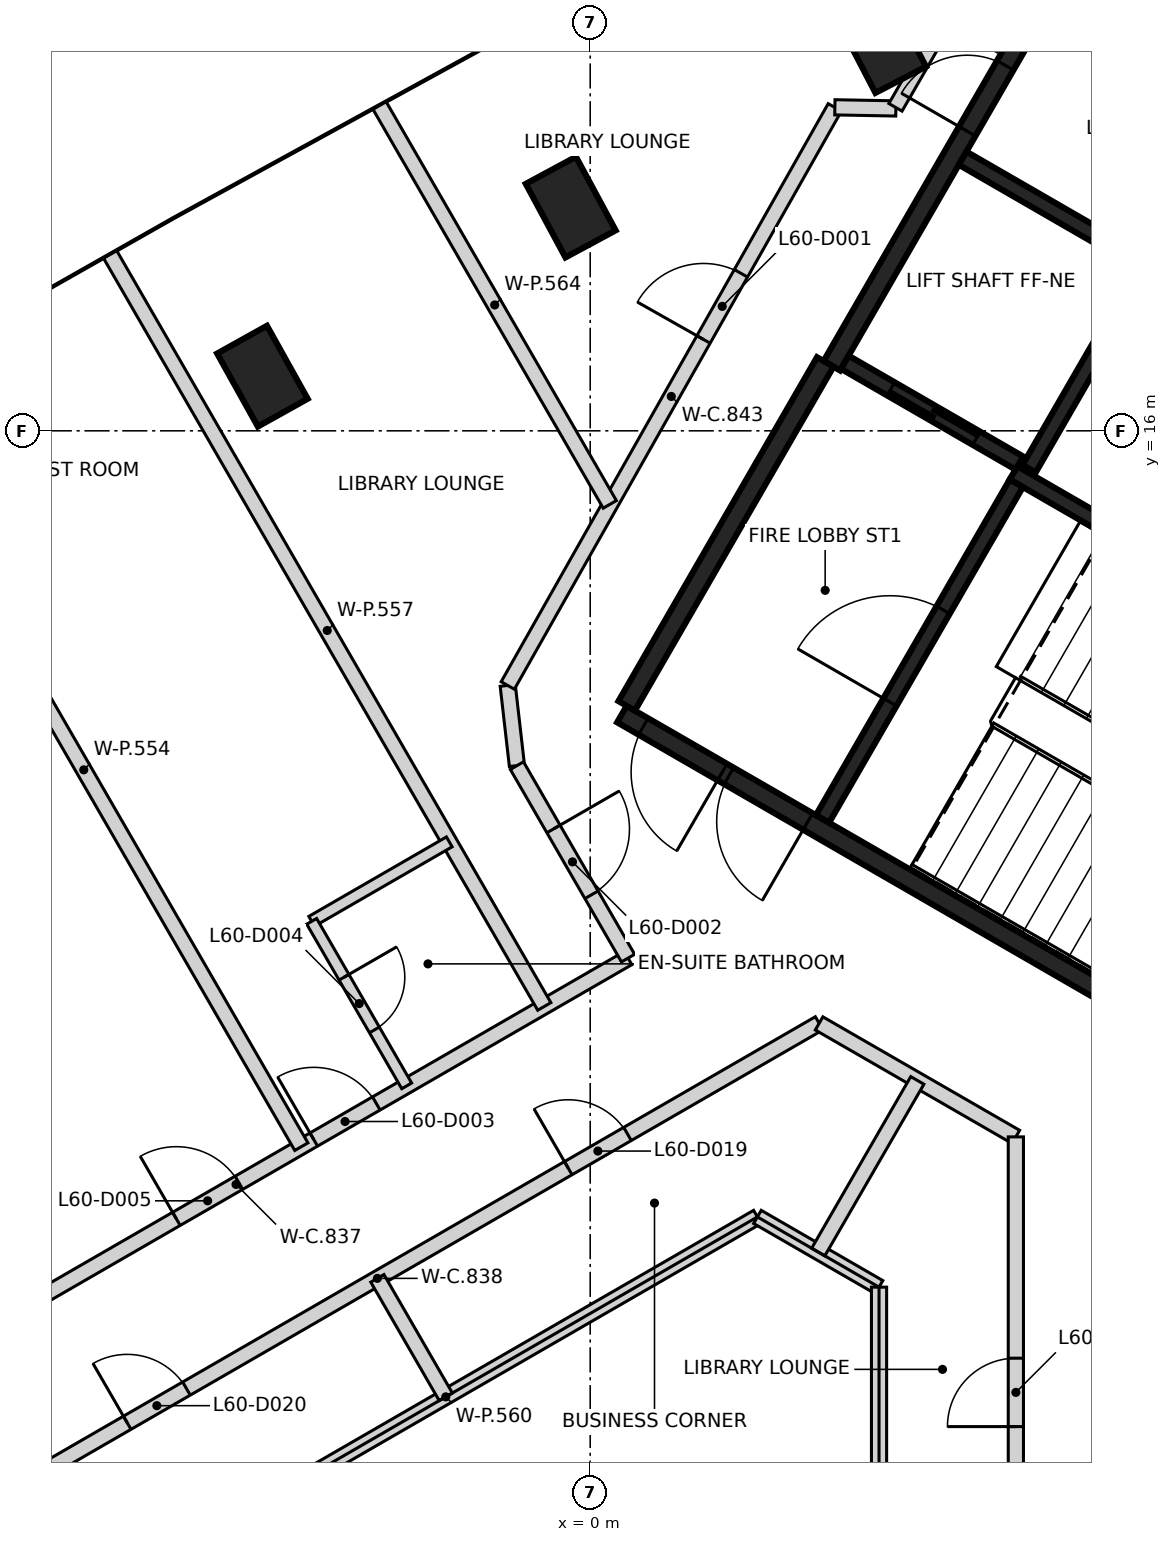
"""IFC4 building model, lengths in metres.
Left out: names, types, materials, properties, quantities, classifications, styles, units other than length and angle.
Written with IfcOpenShell. Run it as: python <this file> out.ifc"""

import sys

from ifc_helpers import new_model, si_unit, direction, frame, frame_2d, origin, origin_2d, place, context, subcontext, project, spatial, rectangle, extrude, element, fill, save


model = new_model("IFC4")
c1 = context("Model", 3, precision=1e-05, world=origin(), true_north=direction((0.0, 1.0)))
c2 = subcontext(c1, "Body", "Model", "MODEL_VIEW")
j1 = project(units=[si_unit("LENGTHUNIT", "METRE"), si_unit("PLANEANGLEUNIT", "RADIAN")], contexts=[c1])
p1 = place(None, origin())
s1 = spatial("IfcSite", under=j1, at=p1, CompositionType="ELEMENT")
p2 = place(p1, origin())
s2 = spatial("IfcBuilding", under=s1, at=p2, CompositionType="ELEMENT")
p3 = place(p2, frame((0.0, 0.0, 239.4)))
s3 = spatial("IfcBuildingStorey", under=s2, at=p3, CompositionType="ELEMENT", Elevation=239.4)
for number, where, z_axis, x_axis in (
    (1, (3.832, 21.107, -0.35), (0.0, 0.0, 1.0), (-0.461, 0.887, 0.0)),
    (2, (-0.256, 18.943, -0.35), (0.0, 0.0, 1.0), (-0.475, 0.88, 0.0)),
    (3, (-4.312, 16.719, -0.35), (0.0, 0.0, 1.0), (-0.487, 0.873, 0.0)),
):
    element("IfcColumn", number, at=place(p3, frame(where, z_axis=z_axis, x_axis=x_axis)), inside=s3, PredefinedType="COLUMN", context=c2, shape_type="SweptSolid", body=[
        extrude(rectangle(XDim=1.1, YDim=0.75, at=origin_2d()), origin(), (0.0, 0.0, 1.0), 3.6),
    ])
p4 = place(p3, frame((10.42, 6.498, 0.0), z_axis=(0.0, 0.0, 1.0), x_axis=(-0.866021906294, 0.500006057782, 0.0)))
e4 = element("IfcWall", 4, at=p4, inside=s3, PredefinedType="SHEAR", context=c2, shape_type="SweptSolid", body=[
    extrude(rectangle(XDim=11.55, YDim=0.25, at=frame_2d((5.775, 0.0))), origin(), (0.0, 0.0, 1.0), 3.25),
])
p5 = place(p4, frame((10.025, 0.0, 0.0)))
e5 = element("IfcOpeningElement", 5, at=p5, cuts=e4, PredefinedType="OPENING", context=c2, shape_type="SweptSolid", body=[
    extrude(rectangle(XDim=1.2, YDim=2.1, at=frame_2d((0.6, 1.05))), frame((0.0, 0.135, 0.0), z_axis=(0.0, -1.0, 0.0), x_axis=(1.0, 0.0, 0.0)), (0.0, 0.0, 1.0), 0.27),
])
p6 = place(p4, frame((8.725, 0.0, 0.0)))
e6 = element("IfcOpeningElement", 6, at=p6, cuts=e4, PredefinedType="OPENING", context=c2, shape_type="SweptSolid", body=[
    extrude(rectangle(XDim=1.2, YDim=2.1, at=frame_2d((0.6, 1.05))), frame((0.0, 0.135, 0.0), z_axis=(0.0, -1.0, 0.0), x_axis=(1.0, 0.0, 0.0)), (0.0, 0.0, 1.0), 0.27),
])
p7 = place(p3, frame((6.304, 22.269, 0.0), z_axis=(0.0, 0.0, 1.0), x_axis=(0.866022959057, -0.500004234368, 0.0)))
e7 = element("IfcWall", 7, at=p7, inside=s3, PredefinedType="SHEAR", context=c2, shape_type="SweptSolid", body=[
    extrude(rectangle(XDim=8.75, YDim=0.25, at=frame_2d((4.375, 0.0))), origin(), (0.0, 0.0, 1.0), 3.25),
])
p8 = place(p3, frame((3.179, 16.856, 0.0), z_axis=(0.0, 0.0, 1.0), x_axis=(0.500001955336, 0.866024274868, 0.0)))
e8 = element("IfcWall", 8, at=p8, inside=s3, PredefinedType="SHEAR", context=c2, shape_type="SweptSolid", body=[
    extrude(rectangle(XDim=6.125, YDim=0.25, at=frame_2d((3.062, 0.0))), origin(), (0.0, 0.0, 1.0), 3.25),
])
p9 = place(p8, frame((3.563, 0.0, 0.0)))
e9 = element("IfcOpeningElement", 9, at=p9, cuts=e8, PredefinedType="OPENING", context=c2, shape_type="SweptSolid", body=[
    extrude(rectangle(XDim=1.0, YDim=2.1, at=frame_2d((0.5, 1.05))), frame((0.0, 0.135, 0.0), z_axis=(0.0, -1.0, 0.0), x_axis=(1.0, 0.0, 0.0)), (0.0, 0.0, 1.0), 0.27),
])
p10 = place(p3, frame((0.48, 12.381, 0.0), z_axis=(0.0, 0.0, 1.0), x_axis=(0.49999885962, 0.866026062182, 0.0)))
e10 = element("IfcWall", 10, at=p10, inside=s3, PredefinedType="SHEAR", context=c2, shape_type="SweptSolid", body=[
    extrude(rectangle(XDim=5.225, YDim=0.25, at=frame_2d((2.612, 0.0))), origin(), (0.0, 0.0, 1.0), 3.25),
])
p11 = place(p3, frame((10.743, 12.46, 0.0), z_axis=(0.0, 0.0, 1.0), x_axis=(-0.866018848283, 0.500011354289, 0.0)))
e11 = element("IfcWall", 11, at=p11, inside=s3, PredefinedType="SHEAR", context=c2, shape_type="SweptSolid", body=[
    extrude(rectangle(XDim=5.974, YDim=0.2, at=frame_2d((2.987, 0.0))), origin(), (0.0, 0.0, 1.0), 3.25),
])
p12 = place(p3, frame((3.057, 10.895, 0.0), z_axis=(0.0, 0.0, 1.0), x_axis=(0.500027839223, 0.866009330205, 0.0)))
e12 = element("IfcWall", 12, at=p12, inside=s3, PredefinedType="SHEAR", context=c2, shape_type="SweptSolid", body=[
    extrude(rectangle(XDim=5.098, YDim=0.2, at=frame_2d((2.549, 0.0))), origin(), (0.0, 0.0, 1.0), 3.25),
])
p13 = place(p12, frame((1.774, 0.0, 0.0)))
e13 = element("IfcOpeningElement", 13, at=p13, cuts=e12, PredefinedType="OPENING", context=c2, shape_type="SweptSolid", body=[
    extrude(rectangle(XDim=1.4, YDim=2.1, at=frame_2d((0.7, 1.05))), frame((0.0, 0.11, 0.0), z_axis=(0.0, -1.0, 0.0), x_axis=(1.0, 0.0, 0.0)), (0.0, 0.0, 1.0), 0.22),
])
p14 = place(p3, frame((7.324, 18.187, 0.0), z_axis=(0.0, 0.0, 1.0), x_axis=(-0.499967891604, -0.866043940782, 0.0)))
e14 = element("IfcWall", 14, at=p14, inside=s3, PredefinedType="SHEAR", context=c2, shape_type="SweptSolid", body=[
    extrude(rectangle(XDim=3.1, YDim=0.2, at=frame_2d((1.55, 0.0))), origin(), (0.0, 0.0, 1.0), 3.25),
])
p15 = place(p3, frame((5.646, 15.576, 0.0), z_axis=(0.0, 0.0, 1.0), x_axis=(-0.866018407898, 0.500012117035, 0.0)))
e15 = element("IfcWall", 15, at=p15, inside=s3, PredefinedType="SHEAR", context=c2, shape_type="SweptSolid", body=[
    extrude(rectangle(XDim=2.651, YDim=0.2, at=frame_2d((1.325, 0.0))), origin(), (0.0, 0.0, 1.0), 3.25),
])
p16 = place(p15, frame((0.652, 0.0, 0.0)))
e16 = element("IfcOpeningElement", 16, at=p16, cuts=e15, PredefinedType="OPENING", context=c2, shape_type="SweptSolid", body=[
    extrude(rectangle(XDim=1.3, YDim=2.1, at=frame_2d((0.65, 1.05))), frame((0.0, 0.11, 0.0), z_axis=(0.0, -1.0, 0.0), x_axis=(1.0, 0.0, 0.0)), (0.0, 0.0, 1.0), 0.22),
])
p17 = place(p3, frame((7.196, 18.26, 0.0), z_axis=(0.0, 0.0, 1.0), x_axis=(-0.866018407898, 0.500012117035, 0.0)))
e17 = element("IfcWall", 17, at=p17, inside=s3, PredefinedType="SHEAR", context=c2, shape_type="SweptSolid", body=[
    extrude(rectangle(XDim=2.651, YDim=0.2, at=frame_2d((1.325, 0.0))), origin(), (0.0, 0.0, 1.0), 3.25),
])
p18 = place(p3, frame((-9.817, 3.108, 0.0), z_axis=(0.0, 0.0, 1.0), x_axis=(0.86603471326, 0.499983875168, 0.0)))
e18 = element("IfcWall", 18, at=p18, inside=s3, PredefinedType="PARTITIONING", context=c2, shape_type="SweptSolid", body=[
    extrude(rectangle(XDim=11.911, YDim=0.2, at=frame_2d((5.955, 0.0))), origin(), (0.0, 0.0, 1.0), 3.25),
])
p19 = place(p18, frame((7.136, 0.0, 0.0)))
e19 = element("IfcOpeningElement", 19, at=p19, cuts=e18, PredefinedType="OPENING", context=c2, shape_type="SweptSolid", body=[
    extrude(rectangle(XDim=0.95, YDim=2.1, at=frame_2d((0.475, 1.05))), frame((0.0, 0.11, 0.0), z_axis=(0.0, -1.0, 0.0), x_axis=(1.0, 0.0, 0.0)), (0.0, 0.0, 1.0), 0.22),
])
p20 = place(p18, frame((5.049, 0.0, 0.0)))
e20 = element("IfcOpeningElement", 20, at=p20, cuts=e18, PredefinedType="OPENING", context=c2, shape_type="SweptSolid", body=[
    extrude(rectangle(XDim=0.95, YDim=2.1, at=frame_2d((0.475, 1.05))), frame((0.0, 0.11, 0.0), z_axis=(0.0, -1.0, 0.0), x_axis=(1.0, 0.0, 0.0)), (0.0, 0.0, 1.0), 0.22),
])
p21 = place(p3, frame((-8.612, 1.494, 0.0), z_axis=(0.0, 0.0, 1.0), x_axis=(0.8660441356, 0.49996755414, 0.0)))
e21 = element("IfcWall", 21, at=p21, inside=s3, PredefinedType="PARTITIONING", context=c2, shape_type="SweptSolid", body=[
    extrude(rectangle(XDim=13.422, YDim=0.2, at=frame_2d((6.711, 0.0))), origin(), (0.0, 0.0, 1.0), 3.25),
])
p22 = place(p21, frame((9.611, 0.0, 0.0)))
e22 = element("IfcOpeningElement", 22, at=p22, cuts=e21, PredefinedType="OPENING", context=c2, shape_type="SweptSolid", body=[
    extrude(rectangle(XDim=0.9, YDim=2.1, at=frame_2d((0.45, 1.05))), frame((0.0, 0.11, 0.0), z_axis=(0.0, -1.0, 0.0), x_axis=(1.0, 0.0, 0.0)), (0.0, 0.0, 1.0), 0.22),
])
p23 = place(p21, frame((2.911, 0.0, 0.0)))
e23 = element("IfcOpeningElement", 23, at=p23, cuts=e21, PredefinedType="OPENING", context=c2, shape_type="SweptSolid", body=[
    extrude(rectangle(XDim=0.9, YDim=2.1, at=frame_2d((0.45, 1.05))), frame((0.0, 0.11, 0.0), z_axis=(0.0, -1.0, 0.0), x_axis=(1.0, 0.0, 0.0)), (0.0, 0.0, 1.0), 0.22),
])
p24 = place(p3, frame((-1.085, 12.65, 0.0), z_axis=(0.0, 0.0, 1.0), x_axis=(0.113812454263, -0.993502252264, 0.0)))
e24 = element("IfcWall", 24, at=p24, inside=s3, PredefinedType="PARTITIONING", context=c2, shape_type="SweptSolid", body=[
    extrude(rectangle(XDim=1.062, YDim=0.2, at=frame_2d((0.531, 0.0))), origin(), (0.0, 0.0, 1.0), 3.25),
])
p25 = place(p3, frame((-1.084, 12.65, 0.0), z_axis=(0.0, 0.0, 1.0), x_axis=(0.492373019537, 0.87038428848, 0.0)))
e25 = element("IfcWall", 25, at=p25, inside=s3, PredefinedType="PARTITIONING", context=c2, shape_type="SweptSolid", body=[
    extrude(rectangle(XDim=8.738, YDim=0.2, at=frame_2d((4.369, 0.0))), origin(), (0.0, 0.0, 1.0), 3.25),
])
p26 = place(p25, frame((5.23, 0.0, 0.0)))
e26 = element("IfcOpeningElement", 26, at=p26, cuts=e25, PredefinedType="OPENING", context=c2, shape_type="SweptSolid", body=[
    extrude(rectangle(XDim=1.0, YDim=2.1, at=frame_2d((0.5, 1.05))), frame((0.0, 0.11, 0.0), z_axis=(0.0, -1.0, 0.0), x_axis=(1.0, 0.0, 0.0)), (0.0, 0.0, 1.0), 0.22),
])
p27 = place(p3, frame((-0.964, 11.595, 0.0), z_axis=(0.0, 0.0, 1.0), x_axis=(0.500081432713, -0.865978383481, 0.0)))
e27 = element("IfcWall", 27, at=p27, inside=s3, PredefinedType="PARTITIONING", context=c2, shape_type="SweptSolid", body=[
    extrude(rectangle(XDim=2.924, YDim=0.2, at=frame_2d((1.462, 0.0))), origin(), (0.0, 0.0, 1.0), 3.25),
])
p28 = place(p27, frame((0.962, 0.0, 0.0)))
e28 = element("IfcOpeningElement", 28, at=p28, cuts=e27, PredefinedType="OPENING", context=c2, shape_type="SweptSolid", body=[
    extrude(rectangle(XDim=1.0, YDim=2.1, at=frame_2d((0.5, 1.05))), frame((0.0, 0.11, 0.0), z_axis=(0.0, -1.0, 0.0), x_axis=(1.0, 0.0, 0.0)), (0.0, 0.0, 1.0), 0.22),
])
p29 = place(p3, frame((3.011, 8.204, 0.0), z_axis=(0.0, 0.0, 1.0), x_axis=(0.86628077395, -0.499557424812, 0.0)))
e29 = element("IfcWall", 29, at=p29, inside=s3, PredefinedType="PARTITIONING", context=c2, shape_type="SweptSolid", body=[
    extrude(rectangle(XDim=2.989, YDim=0.2, at=frame_2d((1.494, 0.0))), origin(), (0.0, 0.0, 1.0), 3.25),
])
p30 = place(p3, frame((3.219, 20.256, 0.0), z_axis=(0.0, 0.0, 1.0), x_axis=(0.99982237262, -0.0188473661, 0.0)))
e30 = element("IfcWall", 30, at=p30, inside=s3, PredefinedType="PARTITIONING", context=c2, shape_type="SweptSolid", body=[
    extrude(rectangle(XDim=0.803, YDim=0.2, at=frame_2d((0.402, 0.0))), origin(), (0.0, 0.0, 1.0), 3.25),
])
p31 = place(p3, frame((4.016, 20.256, 0.0), z_axis=(0.0, 0.0, 1.0), x_axis=(0.500135180047, 0.865947343479, 0.0)))
e31 = element("IfcWall", 31, at=p31, inside=s3, PredefinedType="PARTITIONING", context=c2, shape_type="SweptSolid", body=[
    extrude(rectangle(XDim=1.399, YDim=0.2, at=frame_2d((0.7, 0.0))), origin(), (0.0, 0.0, 1.0), 2.35),
])
p32 = place(p3, frame((5.6, -6.711, 0.0), z_axis=(0.0, 0.0, 1.0), x_axis=(0.0, 1.0, 0.0)))
e32 = element("IfcWall", 32, at=p32, inside=s3, PredefinedType="PARTITIONING", context=c2, shape_type="SweptSolid", body=[
    extrude(rectangle(XDim=13.422, YDim=0.2, at=frame_2d((6.711, 0.0))), origin(), (0.0, 0.0, 1.0), 3.25),
])
p33 = place(p32, frame((2.912, 0.0, 0.0)))
e33 = element("IfcOpeningElement", 33, at=p33, cuts=e32, PredefinedType="OPENING", context=c2, shape_type="SweptSolid", body=[
    extrude(rectangle(XDim=0.9, YDim=2.1, at=frame_2d((0.45, 1.05))), frame((0.0, 0.11, 0.0), z_axis=(0.0, -1.0, 0.0), x_axis=(1.0, 0.0, 0.0)), (0.0, 0.0, 1.0), 0.22),
])
p34 = place(p32, frame((9.611, 0.0, 0.0)))
e34 = element("IfcOpeningElement", 34, at=p34, cuts=e32, PredefinedType="OPENING", context=c2, shape_type="SweptSolid", body=[
    extrude(rectangle(XDim=0.9, YDim=2.1, at=frame_2d((0.45, 1.05))), frame((0.0, 0.11, 0.0), z_axis=(0.0, -1.0, 0.0), x_axis=(1.0, 0.0, 0.0)), (0.0, 0.0, 1.0), 0.22),
])
p35 = place(p3, frame((-9.525, 16.498, 0.0), z_axis=(0.0, 0.0, 1.0), x_axis=(0.500030684965, -0.866007687087, 0.0)))
e35 = element("IfcWall", 35, at=p35, inside=s3, PredefinedType="PARTITIONING", context=c2, shape_type="SweptSolid", body=[
    extrude(rectangle(XDim=11.45, YDim=0.2, at=frame_2d((5.725, 0.0))), origin(), (0.0, 0.0, 1.0), 3.25),
])
p36 = place(p3, frame((-6.315, 18.32, 0.0), z_axis=(0.0, 0.0, 1.0), x_axis=(0.500012296027, -0.866018304553, 0.0)))
e36 = element("IfcWall", 36, at=p36, inside=s3, PredefinedType="PARTITIONING", context=c2, shape_type="SweptSolid", body=[
    extrude(rectangle(XDim=11.423, YDim=0.2, at=frame_2d((5.711, 0.0))), origin(), (0.0, 0.0, 1.0), 2.35),
])
p37 = place(p3, frame((-6.0, 0.924, 0.0), z_axis=(0.0, 0.0, 1.0), x_axis=(0.866012967051, 0.500021540435, 0.0)))
e37 = element("IfcWall", 37, at=p37, inside=s3, PredefinedType="PARTITIONING", context=c2, shape_type="SweptSolid", body=[
    extrude(rectangle(XDim=9.468, YDim=0.2, at=frame_2d((4.734, 0.0))), origin(), (0.0, 0.0, 1.0), 3.25),
])
p38 = place(p3, frame((-2.8, 4.85, 0.0), z_axis=(0.0, 0.0, 1.0), x_axis=(0.500004188491, -0.866022985545, 0.0)))
e38 = element("IfcWall", 38, at=p38, inside=s3, PredefinedType="PARTITIONING", context=c2, shape_type="SweptSolid", body=[
    extrude(rectangle(XDim=1.8, YDim=0.2, at=frame_2d((0.9, 0.0))), origin(), (0.0, 0.0, 1.0), 3.25),
])
p39 = place(p3, frame((-2.771, 20.279, 0.0), z_axis=(0.0, 0.0, 1.0), x_axis=(0.499939878606, -0.866060112105, 0.0)))
e39 = element("IfcWall", 39, at=p39, inside=s3, PredefinedType="PARTITIONING", context=c2, shape_type="SweptSolid", body=[
    extrude(rectangle(XDim=6.059, YDim=0.2, at=frame_2d((3.029, 0.0))), origin(), (0.0, 0.0, 1.0), 2.35),
])
p40 = place(p3, frame((2.2, 5.658, 0.0), z_axis=(0.0, 0.0, 1.0), x_axis=(0.865818011038, -0.500359042851, 0.0)))
e40 = element("IfcWall", 40, at=p40, inside=s3, PredefinedType="PARTITIONING", context=c2, shape_type="SweptSolid", body=[
    extrude(rectangle(XDim=1.848, YDim=0.2, at=frame_2d((0.924, 0.0))), origin(), (0.0, 0.0, 1.0), 3.25),
])
p41 = place(p3, frame((3.0, 5.196, 0.0), z_axis=(0.0, 0.0, 1.0), x_axis=(0.500076354988, 0.865981315724, 0.0)))
e41 = element("IfcWall", 41, at=p41, inside=s3, PredefinedType="PARTITIONING", context=c2, shape_type="SweptSolid", body=[
    extrude(rectangle(XDim=2.607, YDim=0.2, at=frame_2d((1.304, 0.0))), origin(), (0.0, 0.0, 1.0), 3.25),
])
p42 = place(p3, frame((3.8, -4.734, 0.0), z_axis=(0.0, 0.0, 1.0), x_axis=(0.0, 1.0, 0.0)))
e42 = element("IfcWall", 42, at=p42, inside=s3, PredefinedType="PARTITIONING", context=c2, shape_type="SweptSolid", body=[
    extrude(rectangle(XDim=9.468, YDim=0.2, at=frame_2d((4.734, 0.0))), origin(), (0.0, 0.0, 1.0), 3.25),
])
p43 = place(p3, frame((-3.664, 9.547, 0.0), z_axis=(0.0, 0.0, 1.0), x_axis=(0.866049423672, 0.499958394027, 0.0)))
e43 = element("IfcWall", 43, at=p43, inside=s3, PredefinedType="PARTITIONING", context=c2, shape_type="SweptSolid", body=[
    extrude(rectangle(XDim=2.09, YDim=0.15, at=frame_2d((1.045, 0.0))), origin(), (0.0, 0.0, 1.0), 3.25),
])
p44 = place(p3, frame((-3.664, 9.547, 0.0), z_axis=(0.0, 0.0, 1.0), x_axis=(0.500004234368, -0.866022959057, 0.0)))
e44 = element("IfcWall", 44, at=p44, inside=s3, PredefinedType="PARTITIONING", context=c2, shape_type="SweptSolid", body=[
    extrude(rectangle(XDim=2.5, YDim=0.15, at=frame_2d((1.25, 0.0))), origin(), (0.0, 0.0, 1.0), 3.25),
])
p45 = place(p44, frame((0.85, 0.0, 0.0)))
e45 = element("IfcOpeningElement", 45, at=p45, cuts=e44, PredefinedType="OPENING", context=c2, shape_type="SweptSolid", body=[
    extrude(rectangle(XDim=0.8, YDim=2.1, at=frame_2d((0.4, 1.05))), frame((0.0, 0.085, 0.0), z_axis=(0.0, -1.0, 0.0), x_axis=(1.0, 0.0, 0.0)), (0.0, 0.0, 1.0), 0.17),
])
p46 = place(p16, origin())
e46 = element("IfcDoor", 46, at=p46, inside=s3, OperationType="SLIDING_TO_LEFT", PredefinedType="DOOR", context=c2, shape_type="SweptSolid", body=[
    extrude(rectangle(XDim=1.3, YDim=2.1, at=frame_2d((0.65, 1.05))), frame((0.0, 0.025, 0.0), z_axis=(0.0, -1.0, 0.0), x_axis=(1.0, 0.0, 0.0)), (0.0, 0.0, 1.0), 0.05),
])
fill(e16, e46)
p47 = place(p9, origin())
e47 = element("IfcDoor", 47, at=p47, inside=s3, OperationType="SINGLE_SWING_LEFT", PredefinedType="DOOR", context=c2, shape_type="SweptSolid", body=[
    extrude(rectangle(XDim=1.0, YDim=2.1, at=frame_2d((0.5, 1.05))), frame((0.0, 0.025, 0.0), z_axis=(0.0, -1.0, 0.0), x_axis=(1.0, 0.0, 0.0)), (0.0, 0.0, 1.0), 0.05),
])
fill(e9, e47)
p48 = place(p5, origin())
e48 = element("IfcDoor", 48, at=p48, inside=s3, OperationType="SINGLE_SWING_LEFT", PredefinedType="DOOR", context=c2, shape_type="SweptSolid", body=[
    extrude(rectangle(XDim=1.2, YDim=2.1, at=frame_2d((0.6, 1.05))), frame((0.0, 0.025, 0.0), z_axis=(0.0, -1.0, 0.0), x_axis=(1.0, 0.0, 0.0)), (0.0, 0.0, 1.0), 0.05),
])
fill(e5, e48)
p49 = place(p6, origin())
e49 = element("IfcDoor", 49, at=p49, inside=s3, OperationType="SINGLE_SWING_RIGHT", PredefinedType="DOOR", context=c2, shape_type="SweptSolid", body=[
    extrude(rectangle(XDim=1.2, YDim=2.1, at=frame_2d((0.6, 1.05))), frame((0.0, 0.025, 0.0), z_axis=(0.0, -1.0, 0.0), x_axis=(1.0, 0.0, 0.0)), (0.0, 0.0, 1.0), 0.05),
])
fill(e6, e49)
p50 = place(p13, origin())
e50 = element("IfcDoor", 50, at=p50, inside=s3, OperationType="SINGLE_SWING_LEFT", PredefinedType="DOOR", context=c2, shape_type="SweptSolid", body=[
    extrude(rectangle(XDim=1.4, YDim=2.1, at=frame_2d((0.7, 1.05))), frame((0.0, 0.025, 0.0), z_axis=(0.0, -1.0, 0.0), x_axis=(1.0, 0.0, 0.0)), (0.0, 0.0, 1.0), 0.05),
])
fill(e13, e50)
p51 = place(p26, origin())
e51 = element("IfcDoor", 51, at=p51, inside=s3, OperationType="SINGLE_SWING_LEFT", PredefinedType="DOOR", context=c2, shape_type="SweptSolid", body=[
    extrude(rectangle(XDim=1.0, YDim=2.1, at=frame_2d((0.5, 1.05))), frame((0.0, 0.025, 0.0), z_axis=(0.0, -1.0, 0.0), x_axis=(1.0, 0.0, 0.0)), (0.0, 0.0, 1.0), 0.05),
])
fill(e26, e51)
p52 = place(p28, origin())
e52 = element("IfcDoor", 52, at=p52, inside=s3, OperationType="SINGLE_SWING_LEFT", PredefinedType="DOOR", context=c2, shape_type="SweptSolid", body=[
    extrude(rectangle(XDim=1.0, YDim=2.1, at=frame_2d((0.5, 1.05))), frame((0.0, 0.025, 0.0), z_axis=(0.0, -1.0, 0.0), x_axis=(1.0, 0.0, 0.0)), (0.0, 0.0, 1.0), 0.05),
])
fill(e28, e52)
p53 = place(p19, origin())
e53 = element("IfcDoor", 53, at=p53, inside=s3, OperationType="SINGLE_SWING_LEFT", PredefinedType="DOOR", context=c2, shape_type="SweptSolid", body=[
    extrude(rectangle(XDim=0.95, YDim=2.1, at=frame_2d((0.475, 1.05))), frame((0.0, 0.025, 0.0), z_axis=(0.0, -1.0, 0.0), x_axis=(1.0, 0.0, 0.0)), (0.0, 0.0, 1.0), 0.05),
])
fill(e19, e53)
p54 = place(p45, origin())
e54 = element("IfcDoor", 54, at=p54, inside=s3, OperationType="SINGLE_SWING_LEFT", PredefinedType="DOOR", context=c2, shape_type="SweptSolid", body=[
    extrude(rectangle(XDim=0.8, YDim=2.1, at=frame_2d((0.4, 1.05))), frame((0.0, 0.025, 0.0), z_axis=(0.0, -1.0, 0.0), x_axis=(1.0, 0.0, 0.0)), (0.0, 0.0, 1.0), 0.05),
])
fill(e45, e54)
p55 = place(p20, origin())
e55 = element("IfcDoor", 55, at=p55, inside=s3, OperationType="SINGLE_SWING_LEFT", PredefinedType="DOOR", context=c2, shape_type="SweptSolid", body=[
    extrude(rectangle(XDim=0.95, YDim=2.1, at=frame_2d((0.475, 1.05))), frame((0.0, 0.025, 0.0), z_axis=(0.0, -1.0, 0.0), x_axis=(1.0, 0.0, 0.0)), (0.0, 0.0, 1.0), 0.05),
])
fill(e20, e55)
p56 = place(p34, origin())
e56 = element("IfcDoor", 56, at=p56, inside=s3, OperationType="SINGLE_SWING_LEFT", PredefinedType="DOOR", context=c2, shape_type="SweptSolid", body=[
    extrude(rectangle(XDim=0.9, YDim=2.1, at=frame_2d((0.45, 1.05))), frame((0.0, 0.025, 0.0), z_axis=(0.0, -1.0, 0.0), x_axis=(1.0, 0.0, 0.0)), (0.0, 0.0, 1.0), 0.05),
])
fill(e34, e56)
p57 = place(p22, frame((0.9, 0.0, 0.0), z_axis=(0.0, 0.0, 1.0), x_axis=(-1.0, 0.0, 0.0)))
e57 = element("IfcDoor", 57, at=p57, inside=s3, OperationType="SINGLE_SWING_LEFT", PredefinedType="DOOR", context=c2, shape_type="SweptSolid", body=[
    extrude(rectangle(XDim=0.9, YDim=2.1, at=frame_2d((0.45, 1.05))), frame((0.0, 0.025, 0.0), z_axis=(0.0, -1.0, 0.0), x_axis=(1.0, 0.0, 0.0)), (0.0, 0.0, 1.0), 0.05),
])
fill(e22, e57)
p58 = place(p23, frame((0.9, 0.0, 0.0), z_axis=(0.0, 0.0, 1.0), x_axis=(-1.0, 0.0, 0.0)))
e58 = element("IfcDoor", 58, at=p58, inside=s3, OperationType="SINGLE_SWING_LEFT", PredefinedType="DOOR", context=c2, shape_type="SweptSolid", body=[
    extrude(rectangle(XDim=0.9, YDim=2.1, at=frame_2d((0.45, 1.05))), frame((0.0, 0.025, 0.0), z_axis=(0.0, -1.0, 0.0), x_axis=(1.0, 0.0, 0.0)), (0.0, 0.0, 1.0), 0.05),
])
fill(e23, e58)
save(model, sys.argv[1])
